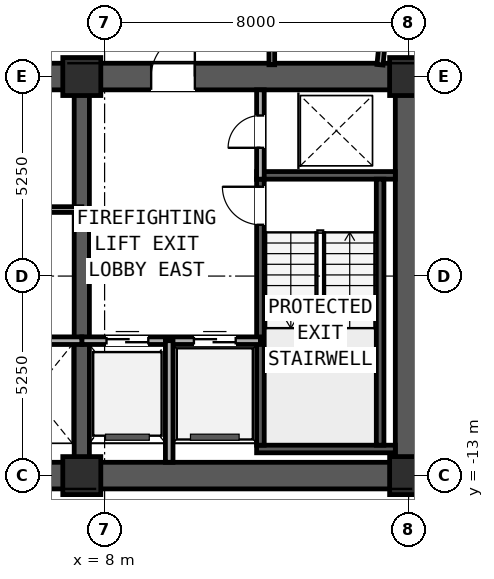
"""IFC4 building model, lengths in metres.
Left out: names, types, materials, properties, quantities, classifications, styles, units other than length and angle.
Written with IfcOpenShell. Run it as: python <this file> out.ifc"""

import sys

from ifc_helpers import new_model, si_unit, direction, frame, frame_2d, origin, origin_2d, place, context, subcontext, project, spatial, rectangle, extrude, element, fill, save


model = new_model("IFC4")
c1 = context("Model", 3, precision=1e-05, world=origin(), true_north=direction((0.0, 1.0)))
c2 = subcontext(c1, "Body", "Model", "MODEL_VIEW")
j1 = project(units=[si_unit("LENGTHUNIT", "METRE"), si_unit("PLANEANGLEUNIT", "RADIAN")], contexts=[c1])
p1 = place(None, origin())
s1 = spatial("IfcSite", under=j1, at=p1, CompositionType="ELEMENT")
p2 = place(p1, origin())
s2 = spatial("IfcBuilding", under=s1, at=p2, CompositionType="ELEMENT")
p3 = place(p2, frame((0.0, 0.0, 139.35)))
s3 = spatial("IfcBuildingStorey", under=s2, at=p3, CompositionType="ELEMENT", Elevation=139.35)
p4 = place(p3, frame((-16.35, -13.0, 0.0), z_axis=(0.0, 0.0, 1.0), x_axis=(1.0, 0.0, 0.0)))
e1 = element("IfcWall", 1, at=p4, inside=s3, PredefinedType="SHEAR", context=c2, shape_type="SweptSolid", body=[
    extrude(rectangle(XDim=32.7, YDim=0.7, at=frame_2d((16.35, 0.0))), origin(), (0.0, 0.0, 1.0), 2.91),
])
p5 = place(p3, frame((-16.35, -2.5, 0.0), z_axis=(0.0, 0.0, 1.0), x_axis=(1.0, 0.0, 0.0)))
e2 = element("IfcWall", 2, at=p5, inside=s3, PredefinedType="SHEAR", context=c2, shape_type="SweptSolid", body=[
    extrude(rectangle(XDim=32.7, YDim=0.7, at=frame_2d((16.35, 0.0))), origin(), (0.0, 0.0, 1.0), 2.91),
])
p6 = place(p5, frame((5.975, 0.0, 0.0)))
e3 = element("IfcOpeningElement", 3, at=p6, cuts=e2, PredefinedType="OPENING", context=c2, shape_type="SweptSolid", body=[
    extrude(rectangle(XDim=1.15, YDim=2.0, at=frame_2d((0.575, 1.0))), frame((0.0, 0.36, 0.0), z_axis=(0.0, -1.0, 0.0), x_axis=(1.0, 0.0, 0.0)), (0.0, 0.0, 1.0), 0.72),
])
p7 = place(p5, frame((15.55, 0.0, 0.0)))
e4 = element("IfcOpeningElement", 4, at=p7, cuts=e2, PredefinedType="OPENING", context=c2, shape_type="SweptSolid", body=[
    extrude(rectangle(XDim=1.6, YDim=2.0, at=frame_2d((0.8, 1.0))), frame((0.0, 0.36, 0.0), z_axis=(0.0, -1.0, 0.0), x_axis=(1.0, 0.0, 0.0)), (0.0, 0.0, 1.0), 0.72),
])
p8 = place(p5, frame((25.575, 0.0, 0.0)))
e5 = element("IfcOpeningElement", 5, at=p8, cuts=e2, PredefinedType="OPENING", context=c2, shape_type="SweptSolid", body=[
    extrude(rectangle(XDim=1.15, YDim=2.0, at=frame_2d((0.575, 1.0))), frame((0.0, 0.36, 0.0), z_axis=(0.0, -1.0, 0.0), x_axis=(1.0, 0.0, 0.0)), (0.0, 0.0, 1.0), 0.72),
])
p9 = place(p3, frame((16.0, -12.65, 0.0), z_axis=(0.0, 0.0, 1.0), x_axis=(0.0, 1.0, 0.0)))
e6 = element("IfcWall", 6, at=p9, inside=s3, PredefinedType="SHEAR", context=c2, shape_type="SweptSolid", body=[
    extrude(rectangle(XDim=9.8, YDim=0.7, at=frame_2d((4.9, 0.0))), origin(), (0.0, 0.0, 1.0), 2.91),
])
p10 = place(p3, frame((7.4, -12.65, 0.0), z_axis=(0.0, 0.0, 1.0), x_axis=(0.0, 1.0, 0.0)))
e7 = element("IfcWall", 7, at=p10, inside=s3, PredefinedType="SHEAR", context=c2, shape_type="SweptSolid", body=[
    extrude(rectangle(XDim=9.8, YDim=0.4, at=frame_2d((4.9, 0.0))), origin(), (0.0, 0.0, 1.0), 3.19),
])
for number, where, z_axis, x_axis in (
    (8, (12.0, -12.3, 0.0), (0.0, 0.0, 1.0), (1.0, 0.0, 0.0)),
    (9, (12.0, -5.1, 0.0), (0.0, 0.0, 1.0), (1.0, 0.0, 0.0)),
):
    element("IfcWall", number, at=place(p3, frame(where, z_axis=z_axis, x_axis=x_axis)), inside=s3, PredefinedType="SOLIDWALL", context=c2, shape_type="SweptSolid", body=[
        extrude(rectangle(XDim=3.65, YDim=0.2, at=frame_2d((1.825, 0.0))), origin(), (0.0, 0.0, 1.0), 3.19),
    ])
p11 = place(p3, frame((12.1, -12.2, 0.0), z_axis=(0.0, 0.0, 1.0), x_axis=(0.0, 1.0, 0.0)))
e10 = element("IfcWall", 10, at=p11, inside=s3, PredefinedType="SOLIDWALL", context=c2, shape_type="SweptSolid", body=[
    extrude(rectangle(XDim=7.0, YDim=0.2, at=frame_2d((3.5, 0.0))), origin(), (0.0, 0.0, 1.0), 3.19),
])
p12 = place(p11, frame((5.8, 0.0, 0.0)))
e11 = element("IfcOpeningElement", 11, at=p12, cuts=e10, PredefinedType="OPENING", context=c2, shape_type="SweptSolid", body=[
    extrude(rectangle(XDim=1.0, YDim=2.1, at=frame_2d((0.5, 1.05))), frame((0.0, 0.11, 0.0), z_axis=(0.0, -1.0, 0.0), x_axis=(1.0, 0.0, 0.0)), (0.0, 0.0, 1.0), 0.22),
])
p13 = place(p3, frame((15.25, -12.2, 0.0), z_axis=(0.0, 0.0, 1.0), x_axis=(0.0, 1.0, 0.0)))
e12 = element("IfcWall", 12, at=p13, inside=s3, PredefinedType="SOLIDWALL", context=c2, shape_type="SweptSolid", body=[
    extrude(rectangle(XDim=7.0, YDim=0.2, at=frame_2d((3.5, 0.0))), origin(), (0.0, 0.0, 1.0), 3.19),
])
for number, where, z_axis, x_axis in (
    (13, (7.4, -13.0, 0.0), (0.0, 0.0, 1.0), (1.0, 0.0, 0.0)),
    (14, (16.0, -13.0, 0.0), (0.0, 0.0, 1.0), (1.0, 0.0, 0.0)),
    (15, (7.4, -2.5, 0.0), (0.0, 0.0, 1.0), (1.0, 0.0, 0.0)),
    (16, (16.0, -2.5, 0.0), (0.0, 0.0, 1.0), (1.0, 0.0, 0.0)),
):
    element("IfcColumn", number, at=place(p3, frame(where, z_axis=z_axis, x_axis=x_axis)), inside=s3, PredefinedType="COLUMN", context=c2, shape_type="SweptSolid", body=[
        extrude(rectangle(XDim=1.0, YDim=1.0, at=origin_2d()), origin(), (0.0, 0.0, 1.0), 3.45),
    ])
p14 = place(p3, frame((-26.695, -13.016, 0.0), z_axis=(0.0, 0.0, 1.0), x_axis=(0.995396268366, -0.095845025554, 0.0)))
e17 = element("IfcWall", 17, at=p14, inside=s3, PredefinedType="STANDARD", context=c2, shape_type="SweptSolid", body=[
    extrude(rectangle(XDim=49.6, YDim=0.24, at=frame_2d((24.8, 0.0))), origin(), (0.0, 0.0, 1.0), 3.19),
])
p15 = place(p14, frame((6.044, 0.0, 0.7)))
e18 = element("IfcOpeningElement", 18, at=p15, cuts=e17, PredefinedType="OPENING", context=c2, shape_type="SweptSolid", body=[
    extrude(rectangle(XDim=1.8, YDim=1.5, at=frame_2d((0.9, 0.75))), frame((0.0, 0.13, 0.0), z_axis=(0.0, -1.0, 0.0), x_axis=(1.0, 0.0, 0.0)), (0.0, 0.0, 1.0), 0.26),
])
p16 = place(p14, frame((41.756, 0.0, 0.7)))
e19 = element("IfcOpeningElement", 19, at=p16, cuts=e17, PredefinedType="OPENING", context=c2, shape_type="SweptSolid", body=[
    extrude(rectangle(XDim=1.8, YDim=1.5, at=frame_2d((0.9, 0.75))), frame((0.0, 0.13, 0.0), z_axis=(0.0, -1.0, 0.0), x_axis=(1.0, 0.0, 0.0)), (0.0, 0.0, 1.0), 0.26),
])
p17 = place(p3, frame((12.1, -5.2, 0.0), z_axis=(0.0, 0.0, 1.0), x_axis=(0.0, 1.0, 0.0)))
e20 = element("IfcWall", 20, at=p17, inside=s3, PredefinedType="PARTITIONING", context=c2, shape_type="SweptSolid", body=[
    extrude(rectangle(XDim=2.35, YDim=0.2, at=frame_2d((1.175, 0.0))), origin(), (0.0, 0.0, 1.0), 2.225),
])
p18 = place(p17, frame((0.825, 0.0, 0.0)))
e21 = element("IfcOpeningElement", 21, at=p18, cuts=e20, PredefinedType="OPENING", context=c2, shape_type="SweptSolid", body=[
    extrude(rectangle(XDim=0.85, YDim=2.05, at=frame_2d((0.425, 1.025))), frame((0.0, 0.11, 0.0), z_axis=(0.0, -1.0, 0.0), x_axis=(1.0, 0.0, 0.0)), (0.0, 0.0, 1.0), 0.22),
])
p19 = place(p3, frame((7.4, -9.45, 0.0), z_axis=(0.0, 0.0, 1.0), x_axis=(1.0, 0.0, 0.0)))
e22 = element("IfcWall", 22, at=p19, inside=s3, PredefinedType="PARTITIONING", context=c2, shape_type="SweptSolid", body=[
    extrude(rectangle(XDim=4.7, YDim=0.2, at=frame_2d((2.35, 0.0))), origin(), (0.0, 0.0, 1.0), 3.19),
])
p20 = place(p19, frame((2.95, 0.0, 0.0)))
e23 = element("IfcOpeningElement", 23, at=p20, cuts=e22, PredefinedType="OPENING", context=c2, shape_type="SweptSolid", body=[
    extrude(rectangle(XDim=1.1, YDim=2.2, at=frame_2d((0.55, 1.1))), frame((0.0, 0.11, 0.0), z_axis=(0.0, -1.0, 0.0), x_axis=(1.0, 0.0, 0.0)), (0.0, 0.0, 1.0), 0.22),
])
p21 = place(p19, frame((0.65, 0.0, 0.0)))
e24 = element("IfcOpeningElement", 24, at=p21, cuts=e22, PredefinedType="OPENING", context=c2, shape_type="SweptSolid", body=[
    extrude(rectangle(XDim=1.1, YDim=2.2, at=frame_2d((0.55, 1.1))), frame((0.0, 0.11, 0.0), z_axis=(0.0, -1.0, 0.0), x_axis=(1.0, 0.0, 0.0)), (0.0, 0.0, 1.0), 0.22),
])
p22 = place(p3, frame((9.7, -12.65, 0.0), z_axis=(0.0, 0.0, 1.0), x_axis=(0.0, 1.0, 0.0)))
e25 = element("IfcWall", 25, at=p22, inside=s3, PredefinedType="PARTITIONING", context=c2, shape_type="SweptSolid", body=[
    extrude(rectangle(XDim=3.2, YDim=0.2, at=frame_2d((1.6, 0.0))), origin(), (0.0, 0.0, 1.0), 2.225),
])
p23 = place(p3, frame((2.55, -9.45, 0.0), z_axis=(0.0, 0.0, 1.0), x_axis=(1.0, 0.0, 0.0)))
e26 = element("IfcWall", 26, at=p23, inside=s3, PredefinedType="PARTITIONING", context=c2, shape_type="SweptSolid", body=[
    extrude(rectangle(XDim=4.85, YDim=0.2, at=frame_2d((2.425, 0.0))), origin(), (0.0, 0.0, 1.0), 3.19),
])
p24 = place(p3, frame((1.6, -6.0, 0.0), z_axis=(0.0, 0.0, 1.0), x_axis=(1.0, 0.0, 0.0)))
e27 = element("IfcWall", 27, at=p24, inside=s3, PredefinedType="PARTITIONING", context=c2, shape_type="SweptSolid", body=[
    extrude(rectangle(XDim=5.8, YDim=0.15, at=frame_2d((2.9, 0.0))), origin(), (0.0, 0.0, 1.0), 3.19),
])
p25 = place(p24, frame((0.9, 0.0, 0.0)))
e28 = element("IfcOpeningElement", 28, at=p25, cuts=e27, PredefinedType="OPENING", context=c2, shape_type="SweptSolid", body=[
    extrude(rectangle(XDim=0.9, YDim=2.1, at=frame_2d((0.45, 1.05))), frame((0.0, 0.085, 0.0), z_axis=(0.0, -1.0, 0.0), x_axis=(1.0, 0.0, 0.0)), (0.0, 0.0, 1.0), 0.17),
])
p26 = place(p24, frame((3.75, 0.0, 0.0)))
e29 = element("IfcOpeningElement", 29, at=p26, cuts=e27, PredefinedType="OPENING", context=c2, shape_type="SweptSolid", body=[
    extrude(rectangle(XDim=0.9, YDim=2.1, at=frame_2d((0.45, 1.05))), frame((0.0, 0.085, 0.0), z_axis=(0.0, -1.0, 0.0), x_axis=(1.0, 0.0, 0.0)), (0.0, 0.0, 1.0), 0.17),
])
p27 = place(p3, frame((12.4, 0.59, 0.0), z_axis=(0.0, 0.0, 1.0), x_axis=(0.0, -1.0, 0.0)))
e30 = element("IfcWall", 30, at=p27, inside=s3, PredefinedType="PARTITIONING", context=c2, shape_type="SweptSolid", body=[
    extrude(rectangle(XDim=2.78, YDim=0.15, at=frame_2d((1.39, 0.0))), origin(), (0.0, 0.0, 1.0), 2.225),
])
p28 = place(p3, frame((15.823, 3.79, 0.0), z_axis=(0.0, 0.0, 1.0), x_axis=(-0.095865726078, -0.99539427493, 0.0)))
e31 = element("IfcWall", 31, at=p28, inside=s3, PredefinedType="PARTITIONING", context=c2, shape_type="SweptSolid", body=[
    extrude(rectangle(XDim=6.008, YDim=0.16, at=frame_2d((3.004, 0.0))), origin(), (0.0, 0.0, 1.0), 2.225),
])
p29 = place(p12, origin())
e32 = element("IfcDoor", 32, at=p29, inside=s3, OperationType="SINGLE_SWING_RIGHT", PredefinedType="DOOR", context=c2, shape_type="SweptSolid", body=[
    extrude(rectangle(XDim=1.0, YDim=2.1, at=frame_2d((0.5, 1.05))), frame((0.0, 0.025, 0.0), z_axis=(0.0, -1.0, 0.0), x_axis=(1.0, 0.0, 0.0)), (0.0, 0.0, 1.0), 0.05),
])
fill(e11, e32)
p30 = place(p18, frame((0.85, 0.0, 0.0), z_axis=(0.0, 0.0, 1.0), x_axis=(-1.0, 0.0, 0.0)))
e33 = element("IfcDoor", 33, at=p30, inside=s3, OperationType="SINGLE_SWING_LEFT", PredefinedType="DOOR", context=c2, shape_type="SweptSolid", body=[
    extrude(rectangle(XDim=0.85, YDim=2.05, at=frame_2d((0.425, 1.025))), frame((0.0, 0.025, 0.0), z_axis=(0.0, -1.0, 0.0), x_axis=(1.0, 0.0, 0.0)), (0.0, 0.0, 1.0), 0.05),
])
fill(e21, e33)
p31 = place(p20, origin())
e34 = element("IfcDoor", 34, at=p31, inside=s3, OperationType="SLIDING_TO_LEFT", PredefinedType="DOOR", context=c2, shape_type="SweptSolid", body=[
    extrude(rectangle(XDim=1.1, YDim=2.2, at=frame_2d((0.55, 1.1))), frame((0.0, 0.025, 0.0), z_axis=(0.0, -1.0, 0.0), x_axis=(1.0, 0.0, 0.0)), (0.0, 0.0, 1.0), 0.05),
])
fill(e23, e34)
p32 = place(p21, origin())
e35 = element("IfcDoor", 35, at=p32, inside=s3, OperationType="SLIDING_TO_RIGHT", PredefinedType="DOOR", context=c2, shape_type="SweptSolid", body=[
    extrude(rectangle(XDim=1.1, YDim=2.2, at=frame_2d((0.55, 1.1))), frame((0.0, 0.025, 0.0), z_axis=(0.0, -1.0, 0.0), x_axis=(1.0, 0.0, 0.0)), (0.0, 0.0, 1.0), 0.05),
])
fill(e24, e35)
p33 = place(p8, origin())
e36 = element("IfcDoor", 36, at=p33, inside=s3, OperationType="SINGLE_SWING_RIGHT", PredefinedType="DOOR", context=c2, shape_type="SweptSolid", body=[
    extrude(rectangle(XDim=1.15, YDim=2.0, at=frame_2d((0.575, 1.0))), frame((0.0, 0.025, 0.0), z_axis=(0.0, -1.0, 0.0), x_axis=(1.0, 0.0, 0.0)), (0.0, 0.0, 1.0), 0.05),
])
fill(e5, e36)
save(model, sys.argv[1])
